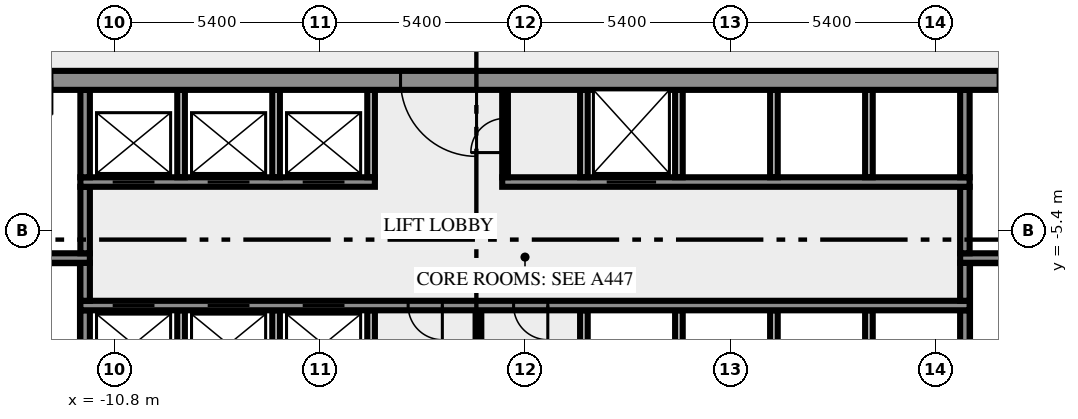
"""IFC4 building model, lengths in metres.
Left out: names, types, materials, properties, quantities, classifications, styles, units other than length and angle.
Written with IfcOpenShell. Run it as: python <this file> out.ifc"""

import sys

from ifc_helpers import new_model, si_unit, direction, frame, frame_2d, origin, place, context, subcontext, project, spatial, rectangle, extrude, element, fill, save


model = new_model("IFC4")
c1 = context("Model", 3, precision=1e-05, world=origin(), true_north=direction((0.0, 1.0)))
c2 = subcontext(c1, "Body", "Model", "MODEL_VIEW")
j1 = project(units=[si_unit("LENGTHUNIT", "METRE"), si_unit("PLANEANGLEUNIT", "RADIAN")], contexts=[c1])
p1 = place(None, origin())
s1 = spatial("IfcSite", under=j1, at=p1, CompositionType="ELEMENT")
p2 = place(p1, origin())
s2 = spatial("IfcBuilding", under=s1, at=p2, CompositionType="ELEMENT")
p3 = place(p2, frame((0.0, 0.0, 11.5)))
s3 = spatial("IfcBuildingStorey", under=s2, at=p3, CompositionType="ELEMENT", Elevation=11.5)
p4 = place(p3, frame((-11.575, -10.5, 0.0), z_axis=(0.0, 0.0, 1.0), x_axis=(0.0, 1.0, 0.0)))
e1 = element("IfcWall", 1, at=p4, inside=s3, PredefinedType="SHEAR", context=c2, shape_type="SweptSolid", body=[
    extrude(rectangle(XDim=3.0, YDim=0.25, at=frame_2d((1.5, 0.0))), origin(), (0.0, 0.0, 1.0), 4.1),
])
for number, where, z_axis, x_axis in (
    (2, (-9.05, -10.5, 0.0), (0.0, 0.0, 1.0), (0.0, 1.0, 0.0)),
    (3, (-6.55, -10.5, 0.0), (0.0, 0.0, 1.0), (0.0, 1.0, 0.0)),
    (4, (-4.05, -10.5, 0.0), (0.0, 0.0, 1.0), (0.0, 1.0, 0.0)),
):
    element("IfcWall", number, at=place(p3, frame(where, z_axis=z_axis, x_axis=x_axis)), inside=s3, PredefinedType="SOLIDWALL", context=c2, shape_type="SweptSolid", body=[
        extrude(rectangle(XDim=3.0, YDim=0.2, at=frame_2d((1.5, 0.0))), origin(), (0.0, 0.0, 1.0), 4.1),
    ])
p5 = place(p3, frame((-1.225, -10.5, 0.0), z_axis=(0.0, 0.0, 1.0), x_axis=(0.0, 1.0, 0.0)))
e5 = element("IfcWall", 5, at=p5, inside=s3, PredefinedType="PARTITIONING", context=c2, shape_type="SweptSolid", body=[
    extrude(rectangle(XDim=3.0, YDim=0.15, at=frame_2d((1.5, 0.0))), origin(), (0.0, 0.0, 1.0), 4.1),
])
for number, where, z_axis, x_axis in (
    (6, (1.55, -10.5, 0.0), (0.0, 0.0, 1.0), (0.0, 1.0, 0.0)),
    (7, (4.05, -10.5, 0.0), (0.0, 0.0, 1.0), (0.0, 1.0, 0.0)),
    (8, (6.55, -10.5, 0.0), (0.0, 0.0, 1.0), (0.0, 1.0, 0.0)),
    (9, (9.05, -10.5, 0.0), (0.0, 0.0, 1.0), (0.0, 1.0, 0.0)),
):
    element("IfcWall", number, at=place(p3, frame(where, z_axis=z_axis, x_axis=x_axis)), inside=s3, PredefinedType="SOLIDWALL", context=c2, shape_type="SweptSolid", body=[
        extrude(rectangle(XDim=3.0, YDim=0.2, at=frame_2d((1.5, 0.0))), origin(), (0.0, 0.0, 1.0), 4.1),
    ])
p6 = place(p3, frame((11.575, -10.5, 0.0), z_axis=(0.0, 0.0, 1.0), x_axis=(0.0, 1.0, 0.0)))
e10 = element("IfcWall", 10, at=p6, inside=s3, PredefinedType="SHEAR", context=c2, shape_type="SweptSolid", body=[
    extrude(rectangle(XDim=3.0, YDim=0.25, at=frame_2d((1.5, 0.0))), origin(), (0.0, 0.0, 1.0), 4.1),
])
p7 = place(p3, frame((11.7, -7.375, 0.0), z_axis=(0.0, 0.0, 1.0), x_axis=(-1.0, 0.0, 0.0)))
e11 = element("IfcWall", 11, at=p7, inside=s3, PredefinedType="SHEAR", context=c2, shape_type="SweptSolid", body=[
    extrude(rectangle(XDim=23.4, YDim=0.25, at=frame_2d((11.7, 0.0))), origin(), (0.0, 0.0, 1.0), 4.1),
])
p8 = place(p7, frame((21.45, 0.0, 0.0)))
e12 = element("IfcOpeningElement", 12, at=p8, cuts=e11, PredefinedType="OPENING", context=c2, shape_type="SweptSolid", body=[
    extrude(rectangle(XDim=1.1, YDim=2.1, at=frame_2d((0.55, 1.05))), frame((0.0, 0.135, 0.0), z_axis=(0.0, -1.0, 0.0), x_axis=(1.0, 0.0, 0.0)), (0.0, 0.0, 1.0), 0.27),
])
p9 = place(p7, frame((18.95, 0.0, 0.0)))
e13 = element("IfcOpeningElement", 13, at=p9, cuts=e11, PredefinedType="OPENING", context=c2, shape_type="SweptSolid", body=[
    extrude(rectangle(XDim=1.1, YDim=2.1, at=frame_2d((0.55, 1.05))), frame((0.0, 0.135, 0.0), z_axis=(0.0, -1.0, 0.0), x_axis=(1.0, 0.0, 0.0)), (0.0, 0.0, 1.0), 0.27),
])
p10 = place(p7, frame((16.45, 0.0, 0.0)))
e14 = element("IfcOpeningElement", 14, at=p10, cuts=e11, PredefinedType="OPENING", context=c2, shape_type="SweptSolid", body=[
    extrude(rectangle(XDim=1.1, YDim=2.1, at=frame_2d((0.55, 1.05))), frame((0.0, 0.135, 0.0), z_axis=(0.0, -1.0, 0.0), x_axis=(1.0, 0.0, 0.0)), (0.0, 0.0, 1.0), 0.27),
])
p11 = place(p7, frame((13.875, 0.0, 0.0)))
e15 = element("IfcOpeningElement", 15, at=p11, cuts=e11, PredefinedType="OPENING", context=c2, shape_type="SweptSolid", body=[
    extrude(rectangle(XDim=0.9, YDim=2.1, at=frame_2d((0.45, 1.05))), frame((0.0, 0.135, 0.0), z_axis=(0.0, -1.0, 0.0), x_axis=(1.0, 0.0, 0.0)), (0.0, 0.0, 1.0), 0.27),
])
p12 = place(p7, frame((11.1, 0.0, 0.0)))
e16 = element("IfcOpeningElement", 16, at=p12, cuts=e11, PredefinedType="OPENING", context=c2, shape_type="SweptSolid", body=[
    extrude(rectangle(XDim=0.9, YDim=2.1, at=frame_2d((0.45, 1.05))), frame((0.0, 0.135, 0.0), z_axis=(0.0, -1.0, 0.0), x_axis=(1.0, 0.0, 0.0)), (0.0, 0.0, 1.0), 0.27),
])
for number, where, z_axis, x_axis in (
    (17, (-11.575, -7.25, 0.0), (0.0, 0.0, 1.0), (0.0, 1.0, 0.0)),
    (18, (11.575, -7.25, 0.0), (0.0, 0.0, 1.0), (0.0, 1.0, 0.0)),
):
    element("IfcWall", number, at=place(p3, frame(where, z_axis=z_axis, x_axis=x_axis)), inside=s3, PredefinedType="SHEAR", context=c2, shape_type="SweptSolid", body=[
        extrude(rectangle(XDim=1.0, YDim=0.25, at=frame_2d((0.5, 0.0))), origin(), (0.0, 0.0, 1.0), 4.1),
    ])
p13 = place(p3, frame((-11.45, -6.125, 0.0), z_axis=(0.0, 0.0, 1.0), x_axis=(-1.0, 0.0, 0.0)))
e19 = element("IfcWall", 19, at=p13, inside=s3, PredefinedType="SHEAR", context=c2, shape_type="SweptSolid", body=[
    extrude(rectangle(XDim=8.05, YDim=0.25, at=frame_2d((4.025, 0.0))), origin(), (0.0, 0.0, 1.0), 4.1),
])
p14 = place(p13, frame((6.2, 0.0, 0.0)))
e20 = element("IfcOpeningElement", 20, at=p14, cuts=e19, PredefinedType="OPENING", context=c2, shape_type="SweptSolid", body=[
    extrude(rectangle(XDim=1.8, YDim=2.1, at=frame_2d((0.9, 1.05))), frame((0.0, 0.135, 0.0), z_axis=(0.0, -1.0, 0.0), x_axis=(1.0, 0.0, 0.0)), (0.0, 0.0, 1.0), 0.27),
])
p15 = place(p3, frame((19.5, -6.125, 0.0), z_axis=(0.0, 0.0, 1.0), x_axis=(-1.0, 0.0, 0.0)))
e21 = element("IfcWall", 21, at=p15, inside=s3, PredefinedType="SHEAR", context=c2, shape_type="SweptSolid", body=[
    extrude(rectangle(XDim=8.05, YDim=0.25, at=frame_2d((4.025, 0.0))), origin(), (0.0, 0.0, 1.0), 4.1),
])
p16 = place(p15, frame((0.05, 0.0, 0.0)))
e22 = element("IfcOpeningElement", 22, at=p16, cuts=e21, PredefinedType="OPENING", context=c2, shape_type="SweptSolid", body=[
    extrude(rectangle(XDim=1.8, YDim=2.1, at=frame_2d((0.9, 1.05))), frame((0.0, 0.135, 0.0), z_axis=(0.0, -1.0, 0.0), x_axis=(1.0, 0.0, 0.0)), (0.0, 0.0, 1.0), 0.27),
])
for number, where, z_axis, x_axis in (
    (23, (-11.575, -6.0, 0.0), (0.0, 0.0, 1.0), (0.0, 1.0, 0.0)),
    (24, (11.575, -6.0, 0.0), (0.0, 0.0, 1.0), (0.0, 1.0, 0.0)),
):
    element("IfcWall", number, at=place(p3, frame(where, z_axis=z_axis, x_axis=x_axis)), inside=s3, PredefinedType="SHEAR", context=c2, shape_type="SweptSolid", body=[
        extrude(rectangle(XDim=1.75, YDim=0.25, at=frame_2d((0.875, 0.0))), origin(), (0.0, 0.0, 1.0), 4.1),
    ])
p17 = place(p3, frame((-11.7, -4.125, 0.0), z_axis=(0.0, 0.0, 1.0), x_axis=(1.0, 0.0, 0.0)))
e25 = element("IfcWall", 25, at=p17, inside=s3, PredefinedType="SHEAR", context=c2, shape_type="SweptSolid", body=[
    extrude(rectangle(XDim=7.75, YDim=0.25, at=frame_2d((3.875, 0.0))), origin(), (0.0, 0.0, 1.0), 4.1),
])
p18 = place(p17, frame((0.85, 0.0, 0.0)))
e26 = element("IfcOpeningElement", 26, at=p18, cuts=e25, PredefinedType="OPENING", context=c2, shape_type="SweptSolid", body=[
    extrude(rectangle(XDim=1.1, YDim=2.1, at=frame_2d((0.55, 1.05))), frame((0.0, 0.135, 0.0), z_axis=(0.0, -1.0, 0.0), x_axis=(1.0, 0.0, 0.0)), (0.0, 0.0, 1.0), 0.27),
])
p19 = place(p17, frame((3.35, 0.0, 0.0)))
e27 = element("IfcOpeningElement", 27, at=p19, cuts=e25, PredefinedType="OPENING", context=c2, shape_type="SweptSolid", body=[
    extrude(rectangle(XDim=1.1, YDim=2.1, at=frame_2d((0.55, 1.05))), frame((0.0, 0.135, 0.0), z_axis=(0.0, -1.0, 0.0), x_axis=(1.0, 0.0, 0.0)), (0.0, 0.0, 1.0), 0.27),
])
p20 = place(p17, frame((5.85, 0.0, 0.0)))
e28 = element("IfcOpeningElement", 28, at=p20, cuts=e25, PredefinedType="OPENING", context=c2, shape_type="SweptSolid", body=[
    extrude(rectangle(XDim=1.1, YDim=2.1, at=frame_2d((0.55, 1.05))), frame((0.0, 0.135, 0.0), z_axis=(0.0, -1.0, 0.0), x_axis=(1.0, 0.0, 0.0)), (0.0, 0.0, 1.0), 0.27),
])
p21 = place(p3, frame((-0.6, -4.125, 0.0), z_axis=(0.0, 0.0, 1.0), x_axis=(1.0, 0.0, 0.0)))
e29 = element("IfcWall", 29, at=p21, inside=s3, PredefinedType="SHEAR", context=c2, shape_type="SweptSolid", body=[
    extrude(rectangle(XDim=12.3, YDim=0.25, at=frame_2d((6.15, 0.0))), origin(), (0.0, 0.0, 1.0), 4.1),
])
p22 = place(p21, frame((2.75, 0.0, 0.0)))
e30 = element("IfcOpeningElement", 30, at=p22, cuts=e29, PredefinedType="OPENING", context=c2, shape_type="SweptSolid", body=[
    extrude(rectangle(XDim=1.3, YDim=2.1, at=frame_2d((0.65, 1.05))), frame((0.0, 0.135, 0.0), z_axis=(0.0, -1.0, 0.0), x_axis=(1.0, 0.0, 0.0)), (0.0, 0.0, 1.0), 0.27),
])
p23 = place(p3, frame((-11.575, -4.0, 0.0), z_axis=(0.0, 0.0, 1.0), x_axis=(0.0, 1.0, 0.0)))
e31 = element("IfcWall", 31, at=p23, inside=s3, PredefinedType="SHEAR", context=c2, shape_type="SweptSolid", body=[
    extrude(rectangle(XDim=2.3, YDim=0.25, at=frame_2d((1.15, 0.0))), origin(), (0.0, 0.0, 1.0), 4.1),
])
for number, where, z_axis, x_axis in (
    (32, (-9.05, -4.0, 0.0), (0.0, 0.0, 1.0), (0.0, 1.0, 0.0)),
    (33, (-6.55, -4.0, 0.0), (0.0, 0.0, 1.0), (0.0, 1.0, 0.0)),
    (34, (-4.05, -4.0, 0.0), (0.0, 0.0, 1.0), (0.0, 1.0, 0.0)),
):
    element("IfcWall", number, at=place(p3, frame(where, z_axis=z_axis, x_axis=x_axis)), inside=s3, PredefinedType="SOLIDWALL", context=c2, shape_type="SweptSolid", body=[
        extrude(rectangle(XDim=2.3, YDim=0.2, at=frame_2d((1.15, 0.0))), origin(), (0.0, 0.0, 1.0), 4.1),
    ])
p24 = place(p3, frame((-0.525, -4.0, 0.0), z_axis=(0.0, 0.0, 1.0), x_axis=(0.0, 1.0, 0.0)))
e35 = element("IfcWall", 35, at=p24, inside=s3, PredefinedType="PARTITIONING", context=c2, shape_type="SweptSolid", body=[
    extrude(rectangle(XDim=2.3, YDim=0.15, at=frame_2d((1.15, 0.0))), origin(), (0.0, 0.0, 1.0), 4.1),
])
p25 = place(p24, frame((0.65, 0.0, 0.0)))
e36 = element("IfcOpeningElement", 36, at=p25, cuts=e35, PredefinedType="OPENING", context=c2, shape_type="SweptSolid", body=[
    extrude(rectangle(XDim=0.9, YDim=2.1, at=frame_2d((0.45, 1.05))), frame((0.0, 0.085, 0.0), z_axis=(0.0, -1.0, 0.0), x_axis=(1.0, 0.0, 0.0)), (0.0, 0.0, 1.0), 0.17),
])
for number, where, z_axis, x_axis in (
    (37, (1.55, -4.0, 0.0), (0.0, 0.0, 1.0), (0.0, 1.0, 0.0)),
    (38, (4.05, -4.0, 0.0), (0.0, 0.0, 1.0), (0.0, 1.0, 0.0)),
    (39, (6.55, -4.0, 0.0), (0.0, 0.0, 1.0), (0.0, 1.0, 0.0)),
    (40, (9.05, -4.0, 0.0), (0.0, 0.0, 1.0), (0.0, 1.0, 0.0)),
):
    element("IfcWall", number, at=place(p3, frame(where, z_axis=z_axis, x_axis=x_axis)), inside=s3, PredefinedType="SOLIDWALL", context=c2, shape_type="SweptSolid", body=[
        extrude(rectangle(XDim=2.3, YDim=0.2, at=frame_2d((1.15, 0.0))), origin(), (0.0, 0.0, 1.0), 4.1),
    ])
p26 = place(p3, frame((11.575, -4.0, 0.0), z_axis=(0.0, 0.0, 1.0), x_axis=(0.0, 1.0, 0.0)))
e41 = element("IfcWall", 41, at=p26, inside=s3, PredefinedType="SHEAR", context=c2, shape_type="SweptSolid", body=[
    extrude(rectangle(XDim=2.3, YDim=0.25, at=frame_2d((1.15, 0.0))), origin(), (0.0, 0.0, 1.0), 4.1),
])
p27 = place(p3, frame((20.49, -1.45, 0.0), z_axis=(0.0, 0.0, 1.0), x_axis=(-1.0, 0.0, 0.0)))
e42 = element("IfcWall", 42, at=p27, inside=s3, PredefinedType="SHEAR", context=c2, shape_type="SweptSolid", body=[
    extrude(rectangle(XDim=40.98, YDim=0.5, at=frame_2d((20.49, 0.0))), origin(), (0.0, 0.0, 1.0), 4.1),
])
p28 = place(p27, frame((38.14, 0.0, 0.0)))
e43 = element("IfcOpeningElement", 43, at=p28, cuts=e42, PredefinedType="OPENING", context=c2, shape_type="SweptSolid", body=[
    extrude(rectangle(XDim=1.8, YDim=2.1, at=frame_2d((0.9, 1.05))), frame((0.0, 0.26, 0.0), z_axis=(0.0, -1.0, 0.0), x_axis=(1.0, 0.0, 0.0)), (0.0, 0.0, 1.0), 0.52),
])
p29 = place(p27, frame((36.728, 0.0, 0.0)))
e44 = element("IfcOpeningElement", 44, at=p29, cuts=e42, PredefinedType="OPENING", context=c2, shape_type="SweptSolid", body=[
    extrude(rectangle(XDim=0.8, YDim=2.1, at=frame_2d((0.4, 1.05))), frame((0.0, 0.26, 0.0), z_axis=(0.0, -1.0, 0.0), x_axis=(1.0, 0.0, 0.0)), (0.0, 0.0, 1.0), 0.52),
])
p30 = place(p27, frame((35.153, 0.0, 0.0)))
e45 = element("IfcOpeningElement", 45, at=p30, cuts=e42, PredefinedType="OPENING", context=c2, shape_type="SweptSolid", body=[
    extrude(rectangle(XDim=0.8, YDim=2.1, at=frame_2d((0.4, 1.05))), frame((0.0, 0.26, 0.0), z_axis=(0.0, -1.0, 0.0), x_axis=(1.0, 0.0, 0.0)), (0.0, 0.0, 1.0), 0.52),
])
p31 = place(p27, frame((32.94, 0.0, 0.0)))
e46 = element("IfcOpeningElement", 46, at=p31, cuts=e42, PredefinedType="OPENING", context=c2, shape_type="SweptSolid", body=[
    extrude(rectangle(XDim=0.9, YDim=2.1, at=frame_2d((0.45, 1.05))), frame((0.0, 0.26, 0.0), z_axis=(0.0, -1.0, 0.0), x_axis=(1.0, 0.0, 0.0)), (0.0, 0.0, 1.0), 0.52),
])
p32 = place(p27, frame((21.765, 0.0, 0.0)))
e47 = element("IfcOpeningElement", 47, at=p32, cuts=e42, PredefinedType="OPENING", context=c2, shape_type="SweptSolid", body=[
    extrude(rectangle(XDim=2.0, YDim=2.1, at=frame_2d((1.0, 1.05))), frame((0.0, 0.26, 0.0), z_axis=(0.0, -1.0, 0.0), x_axis=(1.0, 0.0, 0.0)), (0.0, 0.0, 1.0), 0.52),
])
p33 = place(p27, frame((7.14, 0.0, 0.0)))
e48 = element("IfcOpeningElement", 48, at=p33, cuts=e42, PredefinedType="OPENING", context=c2, shape_type="SweptSolid", body=[
    extrude(rectangle(XDim=0.9, YDim=2.1, at=frame_2d((0.45, 1.05))), frame((0.0, 0.26, 0.0), z_axis=(0.0, -1.0, 0.0), x_axis=(1.0, 0.0, 0.0)), (0.0, 0.0, 1.0), 0.52),
])
p34 = place(p27, frame((4.19, 0.0, 0.0)))
e49 = element("IfcOpeningElement", 49, at=p34, cuts=e42, PredefinedType="OPENING", context=c2, shape_type="SweptSolid", body=[
    extrude(rectangle(XDim=0.9, YDim=2.1, at=frame_2d((0.45, 1.05))), frame((0.0, 0.26, 0.0), z_axis=(0.0, -1.0, 0.0), x_axis=(1.0, 0.0, 0.0)), (0.0, 0.0, 1.0), 0.52),
])
p35 = place(p27, frame((1.04, 0.0, 0.0)))
e50 = element("IfcOpeningElement", 50, at=p35, cuts=e42, PredefinedType="OPENING", context=c2, shape_type="SweptSolid", body=[
    extrude(rectangle(XDim=1.8, YDim=2.1, at=frame_2d((0.9, 1.05))), frame((0.0, 0.26, 0.0), z_axis=(0.0, -1.0, 0.0), x_axis=(1.0, 0.0, 0.0)), (0.0, 0.0, 1.0), 0.52),
])
p36 = place(p8, origin())
e51 = element("IfcDoor", 51, at=p36, inside=s3, OperationType="DOUBLE_DOOR_SLIDING", PredefinedType="DOOR", context=c2, shape_type="SweptSolid", body=[
    extrude(rectangle(XDim=1.1, YDim=2.1, at=frame_2d((0.55, 1.05))), frame((0.0, 0.025, 0.0), z_axis=(0.0, -1.0, 0.0), x_axis=(1.0, 0.0, 0.0)), (0.0, 0.0, 1.0), 0.05),
])
fill(e12, e51)
p37 = place(p9, origin())
e52 = element("IfcDoor", 52, at=p37, inside=s3, OperationType="DOUBLE_DOOR_SLIDING", PredefinedType="DOOR", context=c2, shape_type="SweptSolid", body=[
    extrude(rectangle(XDim=1.1, YDim=2.1, at=frame_2d((0.55, 1.05))), frame((0.0, 0.025, 0.0), z_axis=(0.0, -1.0, 0.0), x_axis=(1.0, 0.0, 0.0)), (0.0, 0.0, 1.0), 0.05),
])
fill(e13, e52)
p38 = place(p10, origin())
e53 = element("IfcDoor", 53, at=p38, inside=s3, OperationType="DOUBLE_DOOR_SLIDING", PredefinedType="DOOR", context=c2, shape_type="SweptSolid", body=[
    extrude(rectangle(XDim=1.1, YDim=2.1, at=frame_2d((0.55, 1.05))), frame((0.0, 0.025, 0.0), z_axis=(0.0, -1.0, 0.0), x_axis=(1.0, 0.0, 0.0)), (0.0, 0.0, 1.0), 0.05),
])
fill(e14, e53)
p39 = place(p11, origin())
e54 = element("IfcDoor", 54, at=p39, inside=s3, OperationType="SINGLE_SWING_RIGHT", PredefinedType="DOOR", context=c2, shape_type="SweptSolid", body=[
    extrude(rectangle(XDim=0.9, YDim=2.1, at=frame_2d((0.45, 1.05))), frame((0.0, 0.025, 0.0), z_axis=(0.0, -1.0, 0.0), x_axis=(1.0, 0.0, 0.0)), (0.0, 0.0, 1.0), 0.05),
])
fill(e15, e54)
p40 = place(p12, origin())
e55 = element("IfcDoor", 55, at=p40, inside=s3, OperationType="SINGLE_SWING_LEFT", PredefinedType="DOOR", context=c2, shape_type="SweptSolid", body=[
    extrude(rectangle(XDim=0.9, YDim=2.1, at=frame_2d((0.45, 1.05))), frame((0.0, 0.025, 0.0), z_axis=(0.0, -1.0, 0.0), x_axis=(1.0, 0.0, 0.0)), (0.0, 0.0, 1.0), 0.05),
])
fill(e16, e55)
p41 = place(p18, origin())
e56 = element("IfcDoor", 56, at=p41, inside=s3, OperationType="DOUBLE_DOOR_SLIDING", PredefinedType="DOOR", context=c2, shape_type="SweptSolid", body=[
    extrude(rectangle(XDim=1.1, YDim=2.1, at=frame_2d((0.55, 1.05))), frame((0.0, 0.025, 0.0), z_axis=(0.0, -1.0, 0.0), x_axis=(1.0, 0.0, 0.0)), (0.0, 0.0, 1.0), 0.05),
])
fill(e26, e56)
p42 = place(p19, origin())
e57 = element("IfcDoor", 57, at=p42, inside=s3, OperationType="DOUBLE_DOOR_SLIDING", PredefinedType="DOOR", context=c2, shape_type="SweptSolid", body=[
    extrude(rectangle(XDim=1.1, YDim=2.1, at=frame_2d((0.55, 1.05))), frame((0.0, 0.025, 0.0), z_axis=(0.0, -1.0, 0.0), x_axis=(1.0, 0.0, 0.0)), (0.0, 0.0, 1.0), 0.05),
])
fill(e27, e57)
p43 = place(p20, origin())
e58 = element("IfcDoor", 58, at=p43, inside=s3, OperationType="DOUBLE_DOOR_SLIDING", PredefinedType="DOOR", context=c2, shape_type="SweptSolid", body=[
    extrude(rectangle(XDim=1.1, YDim=2.1, at=frame_2d((0.55, 1.05))), frame((0.0, 0.025, 0.0), z_axis=(0.0, -1.0, 0.0), x_axis=(1.0, 0.0, 0.0)), (0.0, 0.0, 1.0), 0.05),
])
fill(e28, e58)
p44 = place(p22, origin())
e59 = element("IfcDoor", 59, at=p44, inside=s3, OperationType="DOUBLE_DOOR_SLIDING", PredefinedType="DOOR", context=c2, shape_type="SweptSolid", body=[
    extrude(rectangle(XDim=1.3, YDim=2.1, at=frame_2d((0.65, 1.05))), frame((0.0, 0.025, 0.0), z_axis=(0.0, -1.0, 0.0), x_axis=(1.0, 0.0, 0.0)), (0.0, 0.0, 1.0), 0.05),
])
fill(e30, e59)
p45 = place(p25, origin())
e60 = element("IfcDoor", 60, at=p45, inside=s3, OperationType="SINGLE_SWING_LEFT", PredefinedType="DOOR", context=c2, shape_type="SweptSolid", body=[
    extrude(rectangle(XDim=0.9, YDim=2.1, at=frame_2d((0.45, 1.05))), frame((0.0, 0.025, 0.0), z_axis=(0.0, -1.0, 0.0), x_axis=(1.0, 0.0, 0.0)), (0.0, 0.0, 1.0), 0.05),
])
fill(e36, e60)
p46 = place(p32, origin())
e61 = element("IfcDoor", 61, at=p46, inside=s3, OperationType="DOUBLE_DOOR_SINGLE_SWING", PredefinedType="DOOR", context=c2, shape_type="SweptSolid", body=[
    extrude(rectangle(XDim=2.0, YDim=2.1, at=frame_2d((1.0, 1.05))), frame((0.0, 0.025, 0.0), z_axis=(0.0, -1.0, 0.0), x_axis=(1.0, 0.0, 0.0)), (0.0, 0.0, 1.0), 0.05),
])
fill(e47, e61)
save(model, sys.argv[1])
